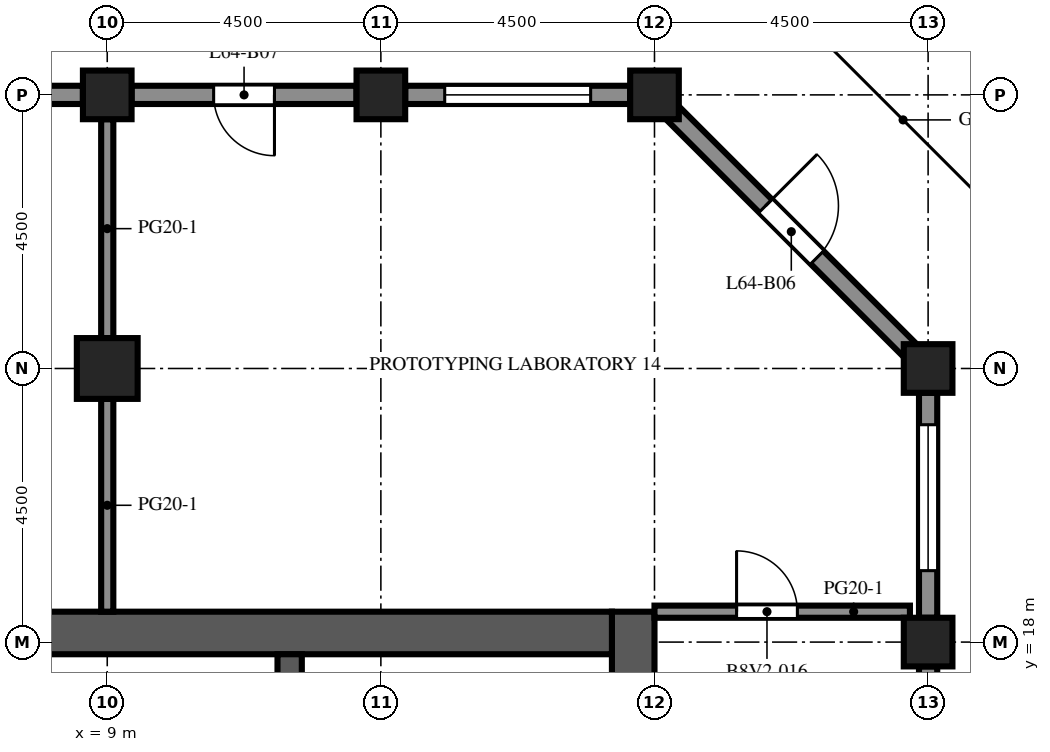
"""IFC4 building model, lengths in metres.
Left out: names, types, materials, properties, quantities, classifications, styles, units other than length and angle.
Written with IfcOpenShell. Run it as: python <this file> out.ifc"""

import sys

from ifc_helpers import new_model, si_unit, direction, frame, frame_2d, origin, origin_2d, place, context, subcontext, project, spatial, rectangle, extrude, element, fill, save


model = new_model("IFC4")
c1 = context("Model", 3, precision=1e-05, world=origin(), true_north=direction((0.0, 1.0)))
c2 = subcontext(c1, "Body", "Model", "MODEL_VIEW")
j1 = project(units=[si_unit("LENGTHUNIT", "METRE"), si_unit("PLANEANGLEUNIT", "RADIAN")], contexts=[c1])
p1 = place(None, origin())
s1 = spatial("IfcSite", under=j1, at=p1, CompositionType="ELEMENT")
p2 = place(p1, origin())
s2 = spatial("IfcBuilding", under=s1, at=p2, CompositionType="ELEMENT")
p3 = place(p2, frame((0.0, 0.0, 282.7)))
s3 = spatial("IfcBuildingStorey", under=s2, at=p3, CompositionType="ELEMENT", Elevation=282.7)
for number, where, z_axis, x_axis in (
    (1, (9.0, 27.0, 0.0), (0.0, 0.0, 1.0), (1.0, 0.0, 0.0)),
    (2, (13.5, 27.0, 0.0), (0.0, 0.0, 1.0), (1.0, 0.0, 0.0)),
    (3, (18.0, 27.0, 0.0), (0.0, 0.0, 1.0), (1.0, 0.0, 0.0)),
    (4, (22.5, 18.0, 0.0), (0.0, 0.0, 1.0), (1.0, 0.0, 0.0)),
    (5, (22.5, 22.5, 0.0), (0.0, 0.0, 1.0), (1.0, 0.0, 0.0)),
):
    element("IfcColumn", number, at=place(p3, frame(where, z_axis=z_axis, x_axis=x_axis)), inside=s3, PredefinedType="COLUMN", context=c2, shape_type="SweptSolid", body=[
        extrude(rectangle(XDim=0.8, YDim=0.8, at=origin_2d()), origin(), (0.0, 0.0, 1.0), 4.1),
    ])
p4 = place(p3, frame((9.0, 22.5, 0.0), z_axis=(0.0, 0.0, 1.0), x_axis=(1.0, 0.0, 0.0)))
e6 = element("IfcColumn", 6, at=p4, inside=s3, PredefinedType="COLUMN", context=c2, shape_type="SweptSolid", body=[
    extrude(rectangle(XDim=1.0, YDim=1.0, at=origin_2d()), origin(), (0.0, 0.0, 1.0), 4.1),
])
p5 = place(p3, frame((17.65, -9.0, 0.0), z_axis=(0.0, 0.0, 1.0), x_axis=(0.0, 1.0, 0.0)))
e7 = element("IfcWall", 7, at=p5, inside=s3, PredefinedType="SHEAR", context=c2, shape_type="SweptSolid", body=[
    extrude(rectangle(XDim=27.5, YDim=0.7, at=frame_2d((13.75, 0.0))), origin(), (0.0, 0.0, 1.0), 4.1),
])
p6 = place(p5, frame((12.55, 0.0, 0.0)))
e8 = element("IfcOpeningElement", 8, at=p6, cuts=e7, PredefinedType="OPENING", context=c2, shape_type="SweptSolid", body=[
    extrude(rectangle(XDim=2.4, YDim=2.4, at=frame_2d((1.2, 1.2))), frame((0.0, 0.36, 0.0), z_axis=(0.0, -1.0, 0.0), x_axis=(1.0, 0.0, 0.0)), (0.0, 0.0, 1.0), 0.72),
])
p7 = place(p5, frame((6.825, 0.0, 0.0)))
e9 = element("IfcOpeningElement", 9, at=p7, cuts=e7, PredefinedType="OPENING", context=c2, shape_type="SweptSolid", body=[
    extrude(rectangle(XDim=1.2, YDim=2.1, at=frame_2d((0.6, 1.05))), frame((0.0, 0.36, 0.0), z_axis=(0.0, -1.0, 0.0), x_axis=(1.0, 0.0, 0.0)), (0.0, 0.0, 1.0), 0.72),
])
p8 = place(p5, frame((19.475, 0.0, 0.0)))
e10 = element("IfcOpeningElement", 10, at=p8, cuts=e7, PredefinedType="OPENING", context=c2, shape_type="SweptSolid", body=[
    extrude(rectangle(XDim=1.2, YDim=2.1, at=frame_2d((0.6, 1.05))), frame((0.0, 0.36, 0.0), z_axis=(0.0, -1.0, 0.0), x_axis=(1.0, 0.0, 0.0)), (0.0, 0.0, 1.0), 0.72),
])
p9 = place(p3, frame((6.7, 18.15, 0.0), z_axis=(0.0, 0.0, 1.0), x_axis=(1.0, 0.0, 0.0)))
e11 = element("IfcWall", 11, at=p9, inside=s3, PredefinedType="SHEAR", context=c2, shape_type="SweptSolid", body=[
    extrude(rectangle(XDim=10.6, YDim=0.7, at=frame_2d((5.3, 0.0))), origin(), (0.0, 0.0, 1.0), 4.1),
])
p10 = place(p3, frame((12.0, 10.2, 0.0), z_axis=(0.0, 0.0, 1.0), x_axis=(0.0, 1.0, 0.0)))
e12 = element("IfcWall", 12, at=p10, inside=s3, PredefinedType="SHEAR", context=c2, shape_type="SweptSolid", body=[
    extrude(rectangle(XDim=7.6, YDim=0.4, at=frame_2d((3.8, 0.0))), origin(), (0.0, 0.0, 1.0), 4.1),
])
p11 = place(p3, frame((22.5, 17.6, 0.0), z_axis=(0.0, 0.0, 1.0), x_axis=(0.0, -1.0, 0.0)))
e13 = element("IfcWall", 13, at=p11, inside=s3, PredefinedType="SOLIDWALL", context=c2, shape_type="SweptSolid", body=[
    extrude(rectangle(XDim=3.7, YDim=0.3, at=frame_2d((1.85, 0.0))), origin(), (0.0, 0.0, 1.0), 2.85),
])
p12 = place(p11, frame((1.35, 0.0, 0.0)))
e14 = element("IfcOpeningElement", 14, at=p12, cuts=e13, PredefinedType="OPENING", context=c2, shape_type="SweptSolid", body=[
    extrude(rectangle(XDim=1.0, YDim=2.2, at=frame_2d((0.5, 1.1))), frame((0.0, 0.16, 0.0), z_axis=(0.0, -1.0, 0.0), x_axis=(1.0, 0.0, 0.0)), (0.0, 0.0, 1.0), 0.32),
])
p13 = place(p3, frame((22.5, 22.1, 0.0), z_axis=(0.0, 0.0, 1.0), x_axis=(0.0, -1.0, 0.0)))
e15 = element("IfcWall", 15, at=p13, inside=s3, PredefinedType="SOLIDWALL", context=c2, shape_type="SweptSolid", body=[
    extrude(rectangle(XDim=3.7, YDim=0.3, at=frame_2d((1.85, 0.0))), origin(), (0.0, 0.0, 1.0), 2.85),
])
p14 = place(p13, frame((0.525, 0.0, 0.8)))
e16 = element("IfcOpeningElement", 16, at=p14, cuts=e15, PredefinedType="OPENING", context=c2, shape_type="SweptSolid", body=[
    extrude(rectangle(XDim=2.4, YDim=1.7, at=frame_2d((1.2, 0.85))), frame((0.0, 0.16, 0.0), z_axis=(0.0, -1.0, 0.0), x_axis=(1.0, 0.0, 0.0)), (0.0, 0.0, 1.0), 0.32),
])
p15 = place(p3, frame((18.294, 26.706, 0.0), z_axis=(0.0, 0.0, 1.0), x_axis=(0.707106781187, -0.707106781187, 0.0)))
e17 = element("IfcWall", 17, at=p15, inside=s3, PredefinedType="SOLIDWALL", context=c2, shape_type="SweptSolid", body=[
    extrude(rectangle(XDim=5.532, YDim=0.3, at=frame_2d((2.766, 0.0))), origin(), (0.0, 0.0, 1.0), 2.85),
])
p16 = place(p15, frame((2.166, 0.0, 0.0)))
e18 = element("IfcOpeningElement", 18, at=p16, cuts=e17, PredefinedType="OPENING", context=c2, shape_type="SweptSolid", body=[
    extrude(rectangle(XDim=1.2, YDim=2.2, at=frame_2d((0.6, 1.1))), frame((0.0, 0.16, 0.0), z_axis=(0.0, -1.0, 0.0), x_axis=(1.0, 0.0, 0.0)), (0.0, 0.0, 1.0), 0.32),
])
p17 = place(p3, frame((13.9, 27.0, 0.0), z_axis=(0.0, 0.0, 1.0), x_axis=(1.0, 0.0, 0.0)))
e19 = element("IfcWall", 19, at=p17, inside=s3, PredefinedType="SOLIDWALL", context=c2, shape_type="SweptSolid", body=[
    extrude(rectangle(XDim=3.7, YDim=0.3, at=frame_2d((1.85, 0.0))), origin(), (0.0, 0.0, 1.0), 2.85),
])
p18 = place(p17, frame((0.65, 0.0, 0.8)))
e20 = element("IfcOpeningElement", 20, at=p18, cuts=e19, PredefinedType="OPENING", context=c2, shape_type="SweptSolid", body=[
    extrude(rectangle(XDim=2.4, YDim=1.7, at=frame_2d((1.2, 0.85))), frame((0.0, 0.16, 0.0), z_axis=(0.0, -1.0, 0.0), x_axis=(1.0, 0.0, 0.0)), (0.0, 0.0, 1.0), 0.32),
])
p19 = place(p3, frame((9.4, 27.0, 0.0), z_axis=(0.0, 0.0, 1.0), x_axis=(1.0, 0.0, 0.0)))
e21 = element("IfcWall", 21, at=p19, inside=s3, PredefinedType="SOLIDWALL", context=c2, shape_type="SweptSolid", body=[
    extrude(rectangle(XDim=3.7, YDim=0.3, at=frame_2d((1.85, 0.0))), origin(), (0.0, 0.0, 1.0), 2.85),
])
p20 = place(p19, frame((1.35, 0.0, 0.0)))
e22 = element("IfcOpeningElement", 22, at=p20, cuts=e21, PredefinedType="OPENING", context=c2, shape_type="SweptSolid", body=[
    extrude(rectangle(XDim=1.0, YDim=2.2, at=frame_2d((0.5, 1.1))), frame((0.0, 0.16, 0.0), z_axis=(0.0, -1.0, 0.0), x_axis=(1.0, 0.0, 0.0)), (0.0, 0.0, 1.0), 0.32),
])
p21 = place(p3, frame((4.9, 27.0, 0.0), z_axis=(0.0, 0.0, 1.0), x_axis=(1.0, 0.0, 0.0)))
e23 = element("IfcWall", 23, at=p21, inside=s3, PredefinedType="SOLIDWALL", context=c2, shape_type="SweptSolid", body=[
    extrude(rectangle(XDim=3.7, YDim=0.3, at=frame_2d((1.85, 0.0))), origin(), (0.0, 0.0, 1.0), 2.85),
])
p22 = place(p21, frame((0.65, 0.0, 0.8)))
e24 = element("IfcOpeningElement", 24, at=p22, cuts=e23, PredefinedType="OPENING", context=c2, shape_type="SweptSolid", body=[
    extrude(rectangle(XDim=2.4, YDim=1.7, at=frame_2d((1.2, 0.85))), frame((0.0, 0.16, 0.0), z_axis=(0.0, -1.0, 0.0), x_axis=(1.0, 0.0, 0.0)), (0.0, 0.0, 1.0), 0.32),
])
p23 = place(p3, frame((8.1, 14.912, 0.0), z_axis=(0.0, 0.0, 1.0), x_axis=(0.0, 1.0, 0.0)))
e25 = element("IfcWall", 25, at=p23, inside=s3, PredefinedType="PARTITIONING", context=c2, shape_type="SweptSolid", body=[
    extrude(rectangle(XDim=2.888, YDim=0.1, at=frame_2d((1.444, 0.0))), origin(), (0.0, 0.0, 1.0), 3.65),
])
p24 = place(p23, frame((0.944, 0.0, 0.0)))
e26 = element("IfcOpeningElement", 26, at=p24, cuts=e25, PredefinedType="OPENING", context=c2, shape_type="SweptSolid", body=[
    extrude(rectangle(XDim=1.0, YDim=2.1, at=frame_2d((0.5, 1.05))), frame((0.0, 0.06, 0.0), z_axis=(0.0, -1.0, 0.0), x_axis=(1.0, 0.0, 0.0)), (0.0, 0.0, 1.0), 0.12),
])
p25 = place(p3, frame((9.0, 18.5, 0.0), z_axis=(0.0, 0.0, 1.0), x_axis=(0.0, 1.0, 0.0)))
e27 = element("IfcWall", 27, at=p25, inside=s3, PredefinedType="PARTITIONING", context=c2, shape_type="SweptSolid", body=[
    extrude(rectangle(XDim=3.5, YDim=0.2, at=frame_2d((1.75, 0.0))), origin(), (0.0, 0.0, 1.0), 3.65),
])
p26 = place(p3, frame((9.0, 23.0, 0.0), z_axis=(0.0, 0.0, 1.0), x_axis=(0.0, 1.0, 0.0)))
e28 = element("IfcWall", 28, at=p26, inside=s3, PredefinedType="PARTITIONING", context=c2, shape_type="SweptSolid", body=[
    extrude(rectangle(XDim=3.6, YDim=0.2, at=frame_2d((1.8, 0.0))), origin(), (0.0, 0.0, 1.0), 3.65),
])
p27 = place(p3, frame((18.0, 18.5, 0.0), z_axis=(0.0, 0.0, 1.0), x_axis=(1.0, 0.0, 0.0)))
e29 = element("IfcWall", 29, at=p27, inside=s3, PredefinedType="PARTITIONING", context=c2, shape_type="SweptSolid", body=[
    extrude(rectangle(XDim=4.201, YDim=0.2, at=frame_2d((2.101, 0.0))), origin(), (0.0, 0.0, 1.0), 3.65),
])
p28 = place(p27, frame((1.35, 0.0, 0.0)))
e30 = element("IfcOpeningElement", 30, at=p28, cuts=e29, PredefinedType="OPENING", context=c2, shape_type="SweptSolid", body=[
    extrude(rectangle(XDim=1.0, YDim=2.1, at=frame_2d((0.5, 1.05))), frame((0.0, 0.11, 0.0), z_axis=(0.0, -1.0, 0.0), x_axis=(1.0, 0.0, 0.0)), (0.0, 0.0, 1.0), 0.22),
])
p29 = place(p14, origin())
e31 = element("IfcWindow", 31, at=p29, inside=s3, PartitioningType="SINGLE_PANEL", PredefinedType="WINDOW", context=c2, shape_type="SweptSolid", body=[
    extrude(rectangle(XDim=2.4, YDim=1.7, at=frame_2d((1.2, 0.85))), frame((0.0, 0.03, 0.0), z_axis=(0.0, -1.0, 0.0), x_axis=(1.0, 0.0, 0.0)), (0.0, 0.0, 1.0), 0.06),
])
fill(e16, e31)
p30 = place(p16, origin())
e32 = element("IfcDoor", 32, at=p30, inside=s3, OperationType="SINGLE_SWING_LEFT", PredefinedType="DOOR", context=c2, shape_type="SweptSolid", body=[
    extrude(rectangle(XDim=1.2, YDim=2.2, at=frame_2d((0.6, 1.1))), frame((0.0, 0.025, 0.0), z_axis=(0.0, -1.0, 0.0), x_axis=(1.0, 0.0, 0.0)), (0.0, 0.0, 1.0), 0.05),
])
fill(e18, e32)
p31 = place(p18, origin())
e33 = element("IfcWindow", 33, at=p31, inside=s3, PartitioningType="SINGLE_PANEL", PredefinedType="WINDOW", context=c2, shape_type="SweptSolid", body=[
    extrude(rectangle(XDim=2.4, YDim=1.7, at=frame_2d((1.2, 0.85))), frame((0.0, 0.03, 0.0), z_axis=(0.0, -1.0, 0.0), x_axis=(1.0, 0.0, 0.0)), (0.0, 0.0, 1.0), 0.06),
])
fill(e20, e33)
p32 = place(p20, origin())
e34 = element("IfcDoor", 34, at=p32, inside=s3, OperationType="SINGLE_SWING_RIGHT", PredefinedType="DOOR", context=c2, shape_type="SweptSolid", body=[
    extrude(rectangle(XDim=1.0, YDim=2.2, at=frame_2d((0.5, 1.1))), frame((0.0, 0.025, 0.0), z_axis=(0.0, -1.0, 0.0), x_axis=(1.0, 0.0, 0.0)), (0.0, 0.0, 1.0), 0.05),
])
fill(e22, e34)
p33 = place(p28, origin())
e35 = element("IfcDoor", 35, at=p33, inside=s3, OperationType="SINGLE_SWING_LEFT", PredefinedType="DOOR", context=c2, shape_type="SweptSolid", body=[
    extrude(rectangle(XDim=1.0, YDim=2.1, at=frame_2d((0.5, 1.05))), frame((0.0, 0.025, 0.0), z_axis=(0.0, -1.0, 0.0), x_axis=(1.0, 0.0, 0.0)), (0.0, 0.0, 1.0), 0.05),
])
fill(e30, e35)
save(model, sys.argv[1])
